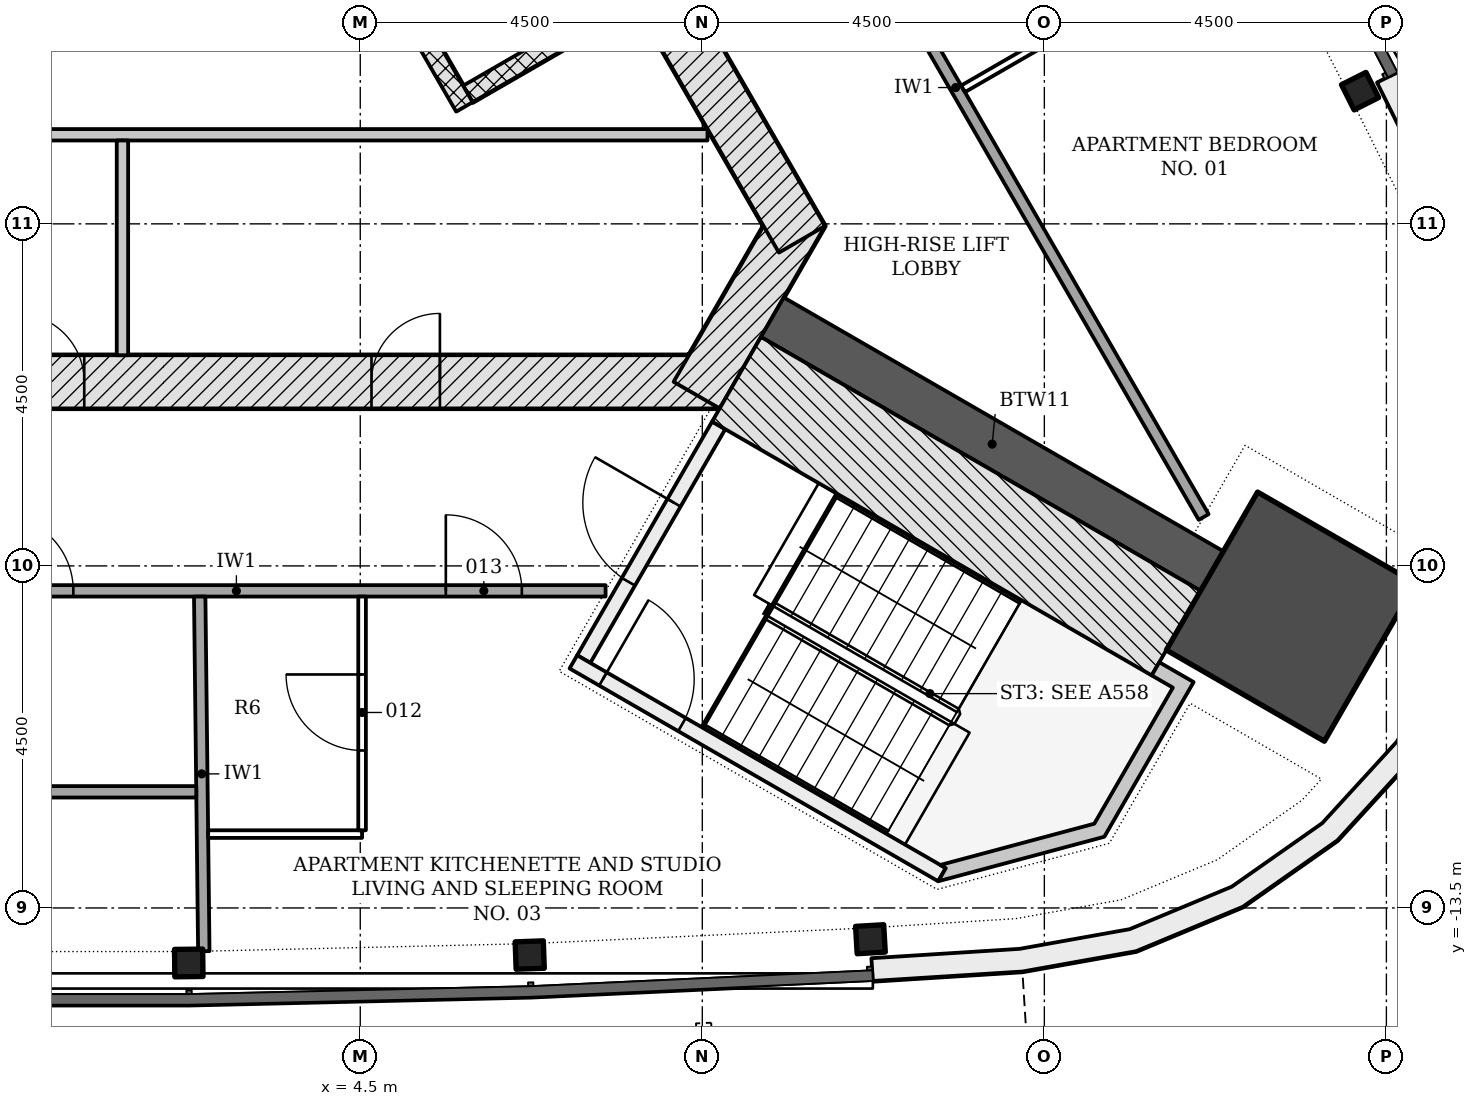
"""IFC4 building model, lengths in metres.
Left out: names, types, materials, properties, quantities, classifications, styles, units other than length and angle.
Written with IfcOpenShell. Run it as: python <this file> out.ifc"""

import sys

from ifc_helpers import new_model, si_unit, direction, frame, frame_2d, origin, origin_2d, place, context, subcontext, project, spatial, polyline, rectangle, i_section, outline, extrude, element, fill, save


model = new_model("IFC4")
c1 = context("Model", 3, precision=1e-05, world=origin(), true_north=direction((0.0, 1.0)))
c2 = subcontext(c1, "Body", "Model", "MODEL_VIEW")
j1 = project(units=[si_unit("LENGTHUNIT", "METRE"), si_unit("PLANEANGLEUNIT", "RADIAN")], contexts=[c1])
p1 = place(None, origin())
s1 = spatial("IfcSite", under=j1, at=p1, CompositionType="ELEMENT")
p2 = place(p1, origin())
s2 = spatial("IfcBuilding", under=s1, at=p2, CompositionType="ELEMENT")
p3 = place(p2, frame((0.0, 0.0, 263.4)))
s3 = spatial("IfcBuildingStorey", under=s2, at=p3, CompositionType="ELEMENT", Elevation=263.4)
p4 = place(p3, frame((-9.229, -6.578, -0.2), z_axis=(0.0, 0.0, 1.0), x_axis=(1.0, 0.0, 0.0)))
e1 = element("IfcWall", 1, at=p4, inside=s3, PredefinedType="SHEAR", context=c2, shape_type="SweptSolid", body=[
    extrude(rectangle(XDim=18.458, YDim=0.7, at=frame_2d((9.229, 0.0))), origin(), (0.0, 0.0, 1.0), 3.6),
])
p5 = place(p4, frame((6.1, 0.0, 0.2)))
e2 = element("IfcOpeningElement", 2, at=p5, cuts=e1, PredefinedType="OPENING", context=c2, shape_type="SweptSolid", body=[
    extrude(rectangle(XDim=1.0, YDim=2.1, at=frame_2d((0.5, 1.05))), frame((0.0, 0.36, 0.0), z_axis=(0.0, -1.0, 0.0), x_axis=(1.0, 0.0, 0.0)), (0.0, 0.0, 1.0), 0.72),
])
p6 = place(p4, frame((2.615, 0.0, 0.2)))
e3 = element("IfcOpeningElement", 3, at=p6, cuts=e1, PredefinedType="OPENING", context=c2, shape_type="SweptSolid", body=[
    extrude(rectangle(XDim=1.0, YDim=2.1, at=frame_2d((0.5, 1.05))), frame((0.0, 0.36, 0.0), z_axis=(0.0, -1.0, 0.0), x_axis=(1.0, 0.0, 0.0)), (0.0, 0.0, 1.0), 0.72),
])
p7 = place(p4, frame((9.198, 0.0, 0.2)))
e4 = element("IfcOpeningElement", 4, at=p7, cuts=e1, PredefinedType="OPENING", context=c2, shape_type="SweptSolid", body=[
    extrude(rectangle(XDim=0.9, YDim=2.1, at=frame_2d((0.45, 1.05))), frame((0.0, 0.36, 0.0), z_axis=(0.0, -1.0, 0.0), x_axis=(1.0, 0.0, 0.0)), (0.0, 0.0, 1.0), 0.72),
])
p8 = place(p4, frame((13.877, 0.0, 0.2)))
e5 = element("IfcOpeningElement", 5, at=p8, cuts=e1, PredefinedType="OPENING", context=c2, shape_type="SweptSolid", body=[
    extrude(rectangle(XDim=0.9, YDim=2.1, at=frame_2d((0.45, 1.05))), frame((0.0, 0.36, 0.0), z_axis=(0.0, -1.0, 0.0), x_axis=(1.0, 0.0, 0.0)), (0.0, 0.0, 1.0), 0.72),
])
p9 = place(p3, frame((8.926, -6.753, -0.2), z_axis=(0.0, 0.0, 1.0), x_axis=(0.500042739161, 0.866000726912, 0.0)))
e6 = element("IfcWall", 6, at=p9, inside=s3, PredefinedType="SHEAR", context=c2, shape_type="SweptSolid", body=[
    extrude(rectangle(XDim=2.771, YDim=0.7, at=frame_2d((1.386, 0.0))), origin(), (0.0, 0.0, 1.0), 3.6),
])
p10 = place(p3, frame((10.311, -4.703, -0.2), z_axis=(0.0, 0.0, 1.0), x_axis=(-0.500001446645, 0.866024568562, 0.0)))
e7 = element("IfcWall", 7, at=p10, inside=s3, PredefinedType="SHEAR", context=c2, shape_type="SweptSolid", body=[
    extrude(rectangle(XDim=18.458, YDim=0.7, at=frame_2d((9.229, 0.0))), origin(), (0.0, 0.0, 1.0), 3.6),
])
p11 = place(p10, frame((4.379, 0.0, 0.2)))
e8 = element("IfcOpeningElement", 8, at=p11, cuts=e7, PredefinedType="OPENING", context=c2, shape_type="SweptSolid", body=[
    extrude(rectangle(XDim=1.1, YDim=2.1, at=frame_2d((0.55, 1.05))), frame((0.0, 0.36, 0.0), z_axis=(0.0, -1.0, 0.0), x_axis=(1.0, 0.0, 0.0)), (0.0, 0.0, 1.0), 0.72),
])
p12 = place(p10, frame((6.529, 0.0, 0.2)))
e9 = element("IfcOpeningElement", 9, at=p12, cuts=e7, PredefinedType="OPENING", context=c2, shape_type="SweptSolid", body=[
    extrude(rectangle(XDim=1.1, YDim=2.1, at=frame_2d((0.55, 1.05))), frame((0.0, 0.36, 0.0), z_axis=(0.0, -1.0, 0.0), x_axis=(1.0, 0.0, 0.0)), (0.0, 0.0, 1.0), 0.72),
])
p13 = place(p10, frame((8.679, 0.0, 0.2)))
e10 = element("IfcOpeningElement", 10, at=p13, cuts=e7, PredefinedType="OPENING", context=c2, shape_type="SweptSolid", body=[
    extrude(rectangle(XDim=1.1, YDim=2.1, at=frame_2d((0.55, 1.05))), frame((0.0, 0.36, 0.0), z_axis=(0.0, -1.0, 0.0), x_axis=(1.0, 0.0, 0.0)), (0.0, 0.0, 1.0), 0.72),
])
p14 = place(p10, frame((10.829, 0.0, 0.2)))
e11 = element("IfcOpeningElement", 11, at=p14, cuts=e7, PredefinedType="OPENING", context=c2, shape_type="SweptSolid", body=[
    extrude(rectangle(XDim=1.1, YDim=2.1, at=frame_2d((0.55, 1.05))), frame((0.0, 0.36, 0.0), z_axis=(0.0, -1.0, 0.0), x_axis=(1.0, 0.0, 0.0)), (0.0, 0.0, 1.0), 0.72),
])
p15 = place(p10, frame((12.979, 0.0, 0.2)))
e12 = element("IfcOpeningElement", 12, at=p15, cuts=e7, PredefinedType="OPENING", context=c2, shape_type="SweptSolid", body=[
    extrude(rectangle(XDim=1.1, YDim=2.1, at=frame_2d((0.55, 1.05))), frame((0.0, 0.36, 0.0), z_axis=(0.0, -1.0, 0.0), x_axis=(1.0, 0.0, 0.0)), (0.0, 0.0, 1.0), 0.72),
])
p16 = place(p3, frame((9.922, -5.728, -0.2), z_axis=(0.0, 0.0, 1.0), x_axis=(0.866032176823, -0.499988268569, 0.0)))
e13 = element("IfcWall", 13, at=p16, inside=s3, PredefinedType="SHEAR", context=c2, shape_type="SweptSolid", body=[
    extrude(rectangle(XDim=6.678, YDim=0.6, at=frame_2d((3.339, 0.0))), origin(), (0.0, 0.0, 1.0), 3.6),
])
p17 = place(p3, frame((16.745, -9.667, -0.2), z_axis=(0.0, 0.0, 1.0), x_axis=(0.866025403784, -0.5, 0.0)))
e14 = element("IfcColumn", 14, at=p17, inside=s3, PredefinedType="COLUMN", context=c2, shape_type="SweptSolid", body=[
    extrude(rectangle(XDim=2.4, YDim=2.4, at=origin_2d()), origin(), (0.0, 0.0, 1.0), 3.6),
])
for number, where, z_axis, x_axis in (
    (15, (2.244, -14.224, -0.2), (0.0, 0.0, 1.0), (1.0, 0.012, 0.0)),
    (16, (6.729, -14.119, -0.2), (0.0, 0.0, 1.0), (0.999, 0.035, 0.0)),
    (17, (11.212, -13.911, -0.2), (0.0, 0.0, 1.0), (0.998, 0.058, 0.0)),
    (18, (17.654, -2.754, -0.2), (0.0, 0.0, 1.0), (-0.449, 0.894, 0.0)),
):
    element("IfcColumn", number, at=place(p3, frame(where, z_axis=z_axis, x_axis=x_axis)), inside=s3, PredefinedType="COLUMN", context=c2, shape_type="SweptSolid", body=[
        extrude(i_section(OverallWidth=0.371, OverallDepth=0.361, WebThickness=0.012, FlangeThickness=0.02, FilletRadius=0.015, at=origin_2d()), origin(), (0.0, 0.0, 1.0), 3.6),
    ])
p18 = place(p3, origin())
e19 = element("IfcWall", 19, at=p18, inside=s3, PredefinedType="NOTDEFINED", context=c2, shape_type="SweptSolid", body=[
    extrude(outline(polyline([(11.244, -14.46), (13.211, -14.336), (14.708, -14.069), (16.111, -13.485), (17.355, -12.611), (18.381, -11.49), (19.141, -10.174), (19.599, -8.724), (19.733, -7.21), (19.538, -5.703), (19.021, -4.273), (18.145, -2.507), (17.876, -2.64), (18.745, -4.391), (19.244, -5.774), (19.432, -7.216), (19.303, -8.665), (18.865, -10.052), (18.138, -11.312), (17.156, -12.385), (15.965, -13.22), (14.623, -13.779), (13.176, -14.038), (11.225, -14.161), (11.244, -14.46)])), origin(), (0.0, 0.0, 1.0), 3.3),
])
p19 = place(p3, frame((8.081, -1.541, -0.2), z_axis=(0.0, 0.0, 1.0), x_axis=(-0.866022959057, -0.500004234368, 0.0)))
e20 = element("IfcWall", 20, at=p19, inside=s3, PredefinedType="PARTITIONING", context=c2, shape_type="SweptSolid", body=[
    extrude(rectangle(XDim=2.5, YDim=0.25, at=frame_2d((1.25, 0.0))), origin(), (0.0, 0.0, 1.0), 3.6),
])
p20 = place(p3, frame((5.87, -2.961, 0.0), z_axis=(0.0, 0.0, 1.0), x_axis=(-0.50000615651, 0.866021849293, 0.0)))
e21 = element("IfcWall", 21, at=p20, inside=s3, PredefinedType="PARTITIONING", context=c2, shape_type="SweptSolid", body=[
    extrude(rectangle(XDim=11.0, YDim=0.25, at=frame_2d((5.5, 0.0))), origin(), (0.0, 0.0, 1.0), 3.4),
])
p21 = place(p3, frame((-1.479, -3.328, 0.0), z_axis=(0.0, 0.0, 1.0), x_axis=(1.0, 0.0, 0.0)))
e22 = element("IfcWall", 22, at=p21, inside=s3, PredefinedType="PARTITIONING", context=c2, shape_type="SweptSolid", body=[
    extrude(rectangle(XDim=10.547, YDim=0.15, at=frame_2d((5.273, 0.0))), origin(), (0.0, 0.0, 1.0), 3.4),
])
p22 = place(p3, frame((1.371, -3.403, 0.0), z_axis=(0.0, 0.0, 1.0), x_axis=(0.0, -1.0, 0.0)))
e23 = element("IfcWall", 23, at=p22, inside=s3, PredefinedType="PARTITIONING", context=c2, shape_type="SweptSolid", body=[
    extrude(rectangle(XDim=2.825, YDim=0.15, at=frame_2d((1.413, 0.0))), origin(), (0.0, 0.0, 1.0), 3.4),
])
p23 = place(p3, frame((7.44, -10.226, -0.2), z_axis=(0.0, 0.0, 1.0), x_axis=(0.500022077904, 0.866012656725, 0.0)))
e24 = element("IfcWall", 24, at=p23, inside=s3, PredefinedType="SHEAR", context=c2, shape_type="SweptSolid", body=[
    extrude(rectangle(XDim=3.55, YDim=0.2, at=frame_2d((1.775, 0.0))), origin(), (0.0, 0.0, 1.0), 3.6),
])
p24 = place(p23, frame((1.175, 0.0, 0.2)))
e25 = element("IfcOpeningElement", 25, at=p24, cuts=e24, PredefinedType="OPENING", context=c2, shape_type="SweptSolid", body=[
    extrude(rectangle(XDim=1.2, YDim=2.1, at=frame_2d((0.6, 1.05))), frame((0.0, 0.11, 0.0), z_axis=(0.0, -1.0, 0.0), x_axis=(1.0, 0.0, 0.0)), (0.0, 0.0, 1.0), 0.22),
])
p25 = place(p3, frame((7.304, -10.262, -0.2), z_axis=(0.0, 0.0, 1.0), x_axis=(0.866026594901, -0.49999793692, 0.0)))
e26 = element("IfcWall", 26, at=p25, inside=s3, PredefinedType="SHEAR", context=c2, shape_type="SweptSolid", body=[
    extrude(rectangle(XDim=5.6, YDim=0.2, at=frame_2d((2.8, 0.0))), origin(), (0.0, 0.0, 1.0), 3.6),
])
p26 = place(p25, frame((0.45, 0.0, 0.2)))
e27 = element("IfcOpeningElement", 27, at=p26, cuts=e26, PredefinedType="OPENING", context=c2, shape_type="SweptSolid", body=[
    extrude(rectangle(XDim=1.2, YDim=2.1, at=frame_2d((0.6, 1.05))), frame((0.0, 0.11, 0.0), z_axis=(0.0, -1.0, 0.0), x_axis=(1.0, 0.0, 0.0)), (0.0, 0.0, 1.0), 0.22),
])
p27 = place(p3, frame((9.45, -6.545, -0.2), z_axis=(0.0, 0.0, 1.0), x_axis=(0.866016347338, -0.500015685897, 0.0)))
e28 = element("IfcWall", 28, at=p27, inside=s3, PredefinedType="SHEAR", context=c2, shape_type="SweptSolid", body=[
    extrude(rectangle(XDim=6.678, YDim=1.286, at=frame_2d((3.339, 0.0))), origin(), (0.0, 0.0, 1.0), 3.6),
])
p28 = place(p3, frame((0.0, 0.0, -0.2)))
e29 = element("IfcWall", 29, at=p28, inside=s3, PredefinedType="SHEAR", context=c2, shape_type="SweptSolid", body=[
    extrude(outline(polyline([(12.104, -13.149), (14.289, -12.563), (15.464, -10.528), (15.013, -10.268), (14.913, -10.441), (15.191, -10.601), (14.157, -12.392), (12.132, -12.934), (12.204, -12.976), (12.204, -12.976), (12.204, -12.976), (12.204, -12.976), (12.204, -12.976), (12.204, -12.976), (12.204, -12.976), (12.204, -12.976), (12.204, -12.976), (12.204, -12.976), (12.204, -12.976), (12.204, -12.976), (12.204, -12.976), (12.204, -12.976), (12.204, -12.976), (12.204, -12.976), (12.204, -12.976), (12.104, -13.149)])), origin(), (0.0, 0.0, 1.0), 3.6),
])
p29 = place(p3, frame((15.596, -8.357, 0.0), z_axis=(0.0, 0.0, 1.0), x_axis=(-0.500010741103, 0.866019202317, 0.0)))
e30 = element("IfcWall", 30, at=p29, inside=s3, PredefinedType="PARTITIONING", context=c2, shape_type="SweptSolid", body=[
    extrude(rectangle(XDim=13.049, YDim=0.15, at=frame_2d((6.524, 0.0))), origin(), (0.0, 0.0, 1.0), 2.852),
])
p30 = place(p3, frame((15.094, -1.186, 0.0), z_axis=(0.0, 0.0, 1.0), x_axis=(-0.866050731258, -0.499956128963, 0.0)))
e31 = element("IfcWall", 31, at=p30, inside=s3, PredefinedType="PARTITIONING", context=c2, shape_type="SweptSolid", body=[
    extrude(rectangle(XDim=3.075, YDim=0.1, at=frame_2d((1.538, 0.0))), origin(), (0.0, 0.0, 1.0), 3.4),
])
p31 = place(p3, frame((-1.987, -9.328, 0.0), z_axis=(0.0, 0.0, 1.0), x_axis=(1.0, 0.0, 0.0)))
e32 = element("IfcWall", 32, at=p31, inside=s3, PredefinedType="PARTITIONING", context=c2, shape_type="SweptSolid", body=[
    extrude(rectangle(XDim=9.714, YDim=0.15, at=frame_2d((4.857, 0.0))), origin(), (0.0, 0.0, 1.0), 2.852),
])
p32 = place(p31, frame((1.712, 0.0, 0.0)))
e33 = element("IfcOpeningElement", 33, at=p32, cuts=e32, PredefinedType="OPENING", context=c2, shape_type="SweptSolid", body=[
    extrude(rectangle(XDim=1.0, YDim=2.1, at=frame_2d((0.5, 1.05))), frame((0.0, 0.085, 0.0), z_axis=(0.0, -1.0, 0.0), x_axis=(1.0, 0.0, 0.0)), (0.0, 0.0, 1.0), 0.17),
])
p33 = place(p31, frame((7.613, 0.0, 0.0)))
e34 = element("IfcOpeningElement", 34, at=p33, cuts=e32, PredefinedType="OPENING", context=c2, shape_type="SweptSolid", body=[
    extrude(rectangle(XDim=1.0, YDim=2.1, at=frame_2d((0.5, 1.05))), frame((0.0, 0.085, 0.0), z_axis=(0.0, -1.0, 0.0), x_axis=(1.0, 0.0, 0.0)), (0.0, 0.0, 1.0), 0.17),
])
p34 = place(p3, frame((2.442, -14.069, 0.0), z_axis=(0.0, 0.0, 1.0), x_axis=(-0.011616170678, 0.999932530013, 0.0)))
e35 = element("IfcWall", 35, at=p34, inside=s3, PredefinedType="PARTITIONING", context=c2, shape_type="SweptSolid", body=[
    extrude(rectangle(XDim=4.666, YDim=0.15, at=frame_2d((2.333, 0.0))), origin(), (0.0, 0.0, 1.0), 3.4),
])
p35 = place(p3, frame((-5.58, -11.972, 0.0), z_axis=(0.0, 0.0, 1.0), x_axis=(1.0, 0.0, 0.0)))
e36 = element("IfcWall", 36, at=p35, inside=s3, PredefinedType="PARTITIONING", context=c2, shape_type="SweptSolid", body=[
    extrude(rectangle(XDim=7.922, YDim=0.15, at=frame_2d((3.961, 0.0))), origin(), (0.0, 0.0, 1.0), 2.852),
])
p36 = place(p35, frame((0.625, 0.0, 0.0)))
e37 = element("IfcOpeningElement", 37, at=p36, cuts=e36, PredefinedType="OPENING", context=c2, shape_type="SweptSolid", body=[
    extrude(rectangle(XDim=1.0, YDim=2.1, at=frame_2d((0.5, 1.05))), frame((0.0, 0.085, 0.0), z_axis=(0.0, -1.0, 0.0), x_axis=(1.0, 0.0, 0.0)), (0.0, 0.0, 1.0), 0.17),
])
p37 = place(p3, frame((2.499, -12.528, 0.0), z_axis=(0.0, 0.0, 1.0), x_axis=(1.0, 0.0, 0.0)))
e38 = element("IfcWall", 38, at=p37, inside=s3, PredefinedType="PARTITIONING", context=c2, shape_type="SweptSolid", body=[
    extrude(rectangle(XDim=2.025, YDim=0.1, at=frame_2d((1.012, 0.0))), origin(), (0.0, 0.0, 1.0), 3.4),
])
p38 = place(p3, frame((4.524, -12.478, 0.0), z_axis=(0.0, 0.0, 1.0), x_axis=(0.0, 1.0, 0.0)))
e39 = element("IfcWall", 39, at=p38, inside=s3, PredefinedType="PARTITIONING", context=c2, shape_type="SweptSolid", body=[
    extrude(rectangle(XDim=3.075, YDim=0.1, at=frame_2d((1.538, 0.0))), origin(), (0.0, 0.0, 1.0), 3.4),
])
p39 = place(p38, frame((1.05, 0.0, 0.0)))
e40 = element("IfcOpeningElement", 40, at=p39, cuts=e39, PredefinedType="OPENING", context=c2, shape_type="SweptSolid", body=[
    extrude(rectangle(XDim=1.0, YDim=2.1, at=frame_2d((0.5, 1.05))), frame((0.0, 0.06, 0.0), z_axis=(0.0, -1.0, 0.0), x_axis=(1.0, 0.0, 0.0)), (0.0, 0.0, 1.0), 0.12),
])
p40 = place(p7, origin())
e41 = element("IfcDoor", 41, at=p40, inside=s3, OperationType="SINGLE_SWING_LEFT", PredefinedType="DOOR", context=c2, shape_type="SweptSolid", body=[
    extrude(rectangle(XDim=0.9, YDim=2.1, at=frame_2d((0.45, 1.05))), frame((0.0, 0.075, 0.0), z_axis=(0.0, -1.0, 0.0), x_axis=(1.0, 0.0, 0.0)), (0.0, 0.0, 1.0), 0.15),
])
fill(e4, e41)
p41 = place(p8, origin())
e42 = element("IfcDoor", 42, at=p41, inside=s3, OperationType="SINGLE_SWING_RIGHT", PredefinedType="DOOR", context=c2, shape_type="SweptSolid", body=[
    extrude(rectangle(XDim=0.9, YDim=2.1, at=frame_2d((0.45, 1.05))), frame((0.0, 0.075, 0.0), z_axis=(0.0, -1.0, 0.0), x_axis=(1.0, 0.0, 0.0)), (0.0, 0.0, 1.0), 0.15),
])
fill(e5, e42)
p42 = place(p24, origin())
e43 = element("IfcDoor", 43, at=p42, inside=s3, OperationType="SINGLE_SWING_RIGHT", PredefinedType="DOOR", context=c2, shape_type="SweptSolid", body=[
    extrude(rectangle(XDim=1.2, YDim=2.1, at=frame_2d((0.6, 1.05))), frame((0.0, 0.025, 0.0), z_axis=(0.0, -1.0, 0.0), x_axis=(1.0, 0.0, 0.0)), (0.0, 0.0, 1.0), 0.05),
])
fill(e25, e43)
p43 = place(p26, origin())
e44 = element("IfcDoor", 44, at=p43, inside=s3, OperationType="SINGLE_SWING_LEFT", PredefinedType="DOOR", context=c2, shape_type="SweptSolid", body=[
    extrude(rectangle(XDim=1.2, YDim=2.1, at=frame_2d((0.6, 1.05))), frame((0.0, 0.025, 0.0), z_axis=(0.0, -1.0, 0.0), x_axis=(1.0, 0.0, 0.0)), (0.0, 0.0, 1.0), 0.05),
])
fill(e27, e44)
p44 = place(p32, origin())
e45 = element("IfcDoor", 45, at=p44, inside=s3, OperationType="SINGLE_SWING_LEFT", PredefinedType="DOOR", context=c2, shape_type="SweptSolid", body=[
    extrude(rectangle(XDim=1.0, YDim=2.1, at=frame_2d((0.5, 1.05))), frame((0.0, 0.025, 0.0), z_axis=(0.0, -1.0, 0.0), x_axis=(1.0, 0.0, 0.0)), (0.0, 0.0, 1.0), 0.05),
])
fill(e33, e45)
p45 = place(p39, origin())
e46 = element("IfcDoor", 46, at=p45, inside=s3, OperationType="SINGLE_SWING_RIGHT", PredefinedType="DOOR", context=c2, shape_type="SweptSolid", body=[
    extrude(rectangle(XDim=1.0, YDim=2.1, at=frame_2d((0.5, 1.05))), frame((0.0, 0.025, 0.0), z_axis=(0.0, -1.0, 0.0), x_axis=(1.0, 0.0, 0.0)), (0.0, 0.0, 1.0), 0.05),
])
fill(e40, e46)
p46 = place(p33, origin())
e47 = element("IfcDoor", 47, at=p46, inside=s3, OperationType="SINGLE_SWING_LEFT", PredefinedType="DOOR", context=c2, shape_type="SweptSolid", body=[
    extrude(rectangle(XDim=1.0, YDim=2.1, at=frame_2d((0.5, 1.05))), frame((0.0, 0.025, 0.0), z_axis=(0.0, -1.0, 0.0), x_axis=(1.0, 0.0, 0.0)), (0.0, 0.0, 1.0), 0.05),
])
fill(e34, e47)
save(model, sys.argv[1])
